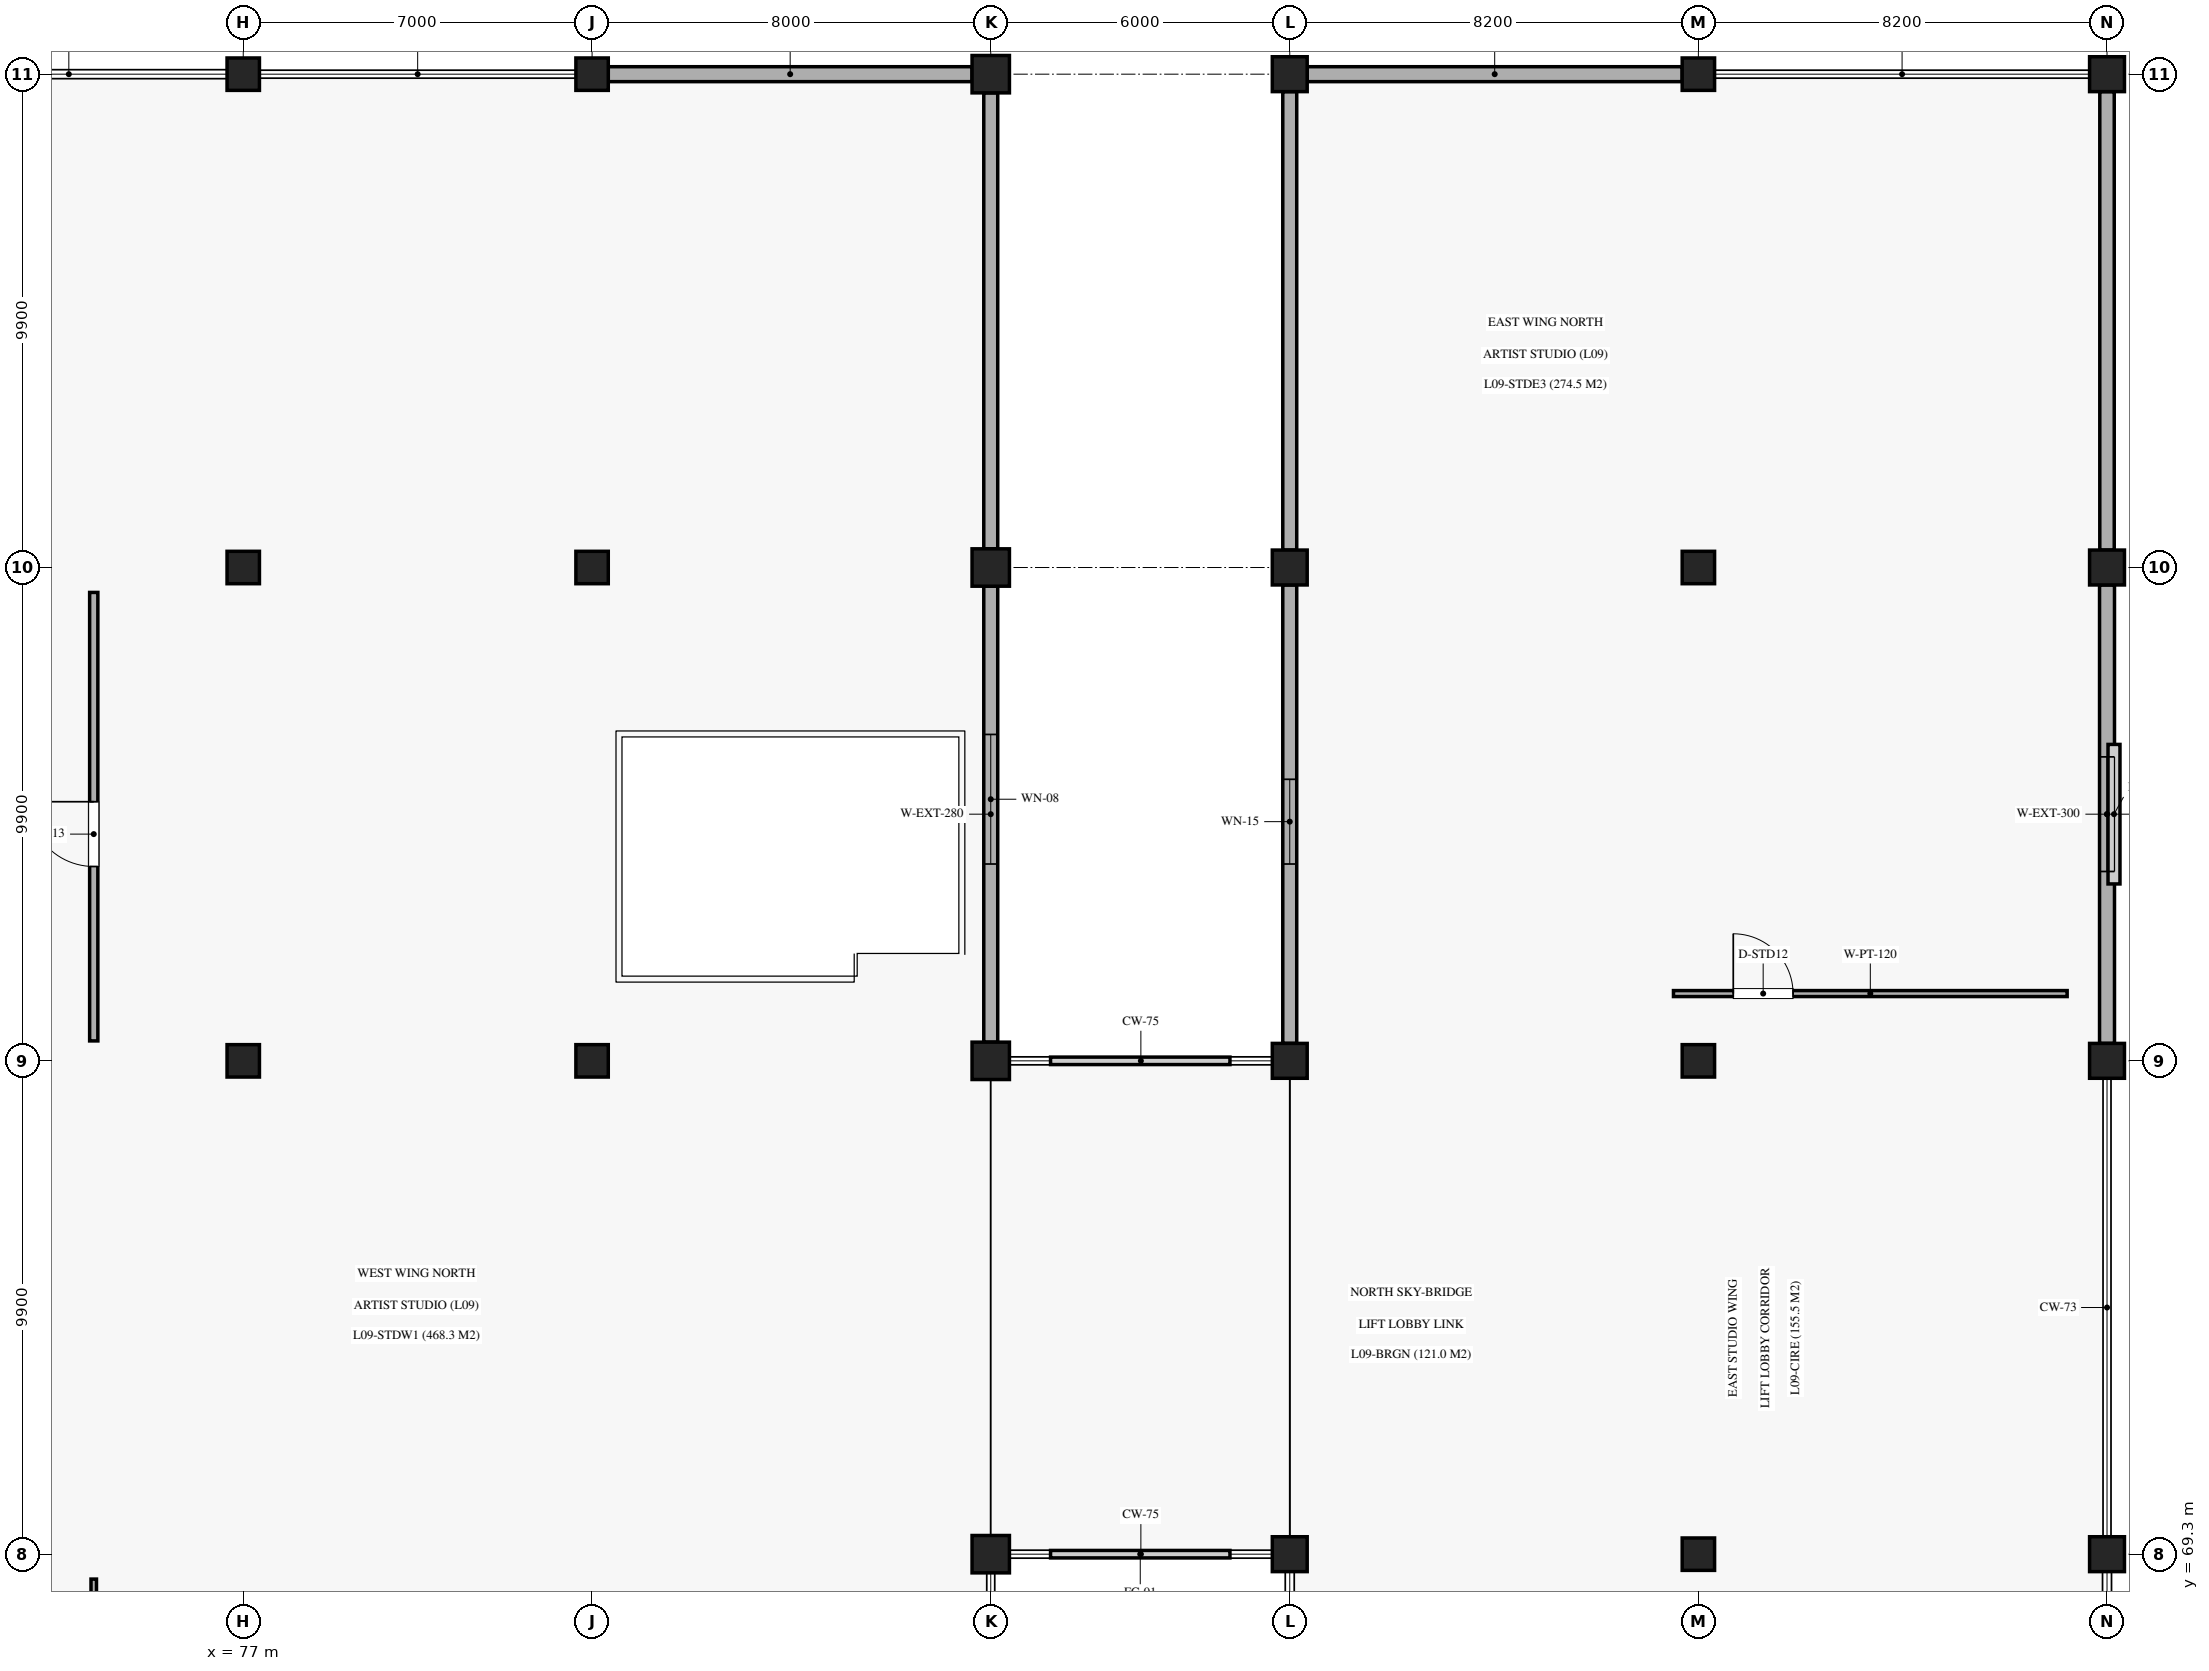
"""IFC4 building model, lengths in metres.
Left out: names, types, materials, properties, quantities, classifications, styles, units other than length and angle.
Written with IfcOpenShell. Run it as: python <this file> out.ifc"""

import sys

from ifc_helpers import new_model, si_unit, direction, frame, frame_2d, origin, origin_2d, place, context, subcontext, project, spatial, rectangle, extrude, element, fill, save


model = new_model("IFC4")
c1 = context("Model", 3, precision=1e-05, world=origin(), true_north=direction((0.0, 1.0)))
c2 = subcontext(c1, "Body", "Model", "MODEL_VIEW")
j1 = project(units=[si_unit("LENGTHUNIT", "METRE"), si_unit("PLANEANGLEUNIT", "RADIAN")], contexts=[c1])
p1 = place(None, origin())
s1 = spatial("IfcSite", under=j1, at=p1, CompositionType="ELEMENT")
p2 = place(p1, origin())
s2 = spatial("IfcBuilding", under=s1, at=p2, CompositionType="ELEMENT")
p3 = place(p2, frame((0.0, 0.0, 46.92)))
s3 = spatial("IfcBuildingStorey", under=s2, at=p3, CompositionType="ELEMENT", Elevation=46.92)
for number, where, z_axis, x_axis in (
    (1, (77.0, 79.2, 0.0), (0.0, 0.0, 1.0), (1.0, 0.0, 0.0)),
    (2, (77.0, 89.1, 0.0), (0.0, 0.0, 1.0), (1.0, 0.0, 0.0)),
    (3, (77.0, 99.0, 0.0), (0.0, 0.0, 1.0), (1.0, 0.0, 0.0)),
    (4, (84.0, 79.2, 0.0), (0.0, 0.0, 1.0), (1.0, 0.0, 0.0)),
    (5, (84.0, 89.1, 0.0), (0.0, 0.0, 1.0), (1.0, 0.0, 0.0)),
    (6, (84.0, 99.0, 0.0), (0.0, 0.0, 1.0), (1.0, 0.0, 0.0)),
):
    element("IfcColumn", number, at=place(p3, frame(where, z_axis=z_axis, x_axis=x_axis)), inside=s3, PredefinedType="COLUMN", context=c2, shape_type="SweptSolid", body=[
        extrude(rectangle(XDim=0.65, YDim=0.65, at=origin_2d()), origin(), (0.0, 0.0, 1.0), 5.1),
    ])
for number, where, z_axis, x_axis in (
    (7, (92.0, 69.3, 0.0), (0.0, 0.0, 1.0), (1.0, 0.0, 0.0)),
    (8, (92.0, 79.2, 0.0), (0.0, 0.0, 1.0), (1.0, 0.0, 0.0)),
    (9, (92.0, 89.1, 0.0), (0.0, 0.0, 1.0), (1.0, 0.0, 0.0)),
    (10, (92.0, 99.0, 0.0), (0.0, 0.0, 1.0), (1.0, 0.0, 0.0)),
):
    element("IfcColumn", number, at=place(p3, frame(where, z_axis=z_axis, x_axis=x_axis)), inside=s3, PredefinedType="COLUMN", context=c2, shape_type="SweptSolid", body=[
        extrude(rectangle(XDim=0.75, YDim=0.75, at=origin_2d()), origin(), (0.0, 0.0, 1.0), 5.1),
    ])
for number, where, z_axis, x_axis in (
    (11, (98.0, 69.3, 0.0), (0.0, 0.0, 1.0), (1.0, 0.0, 0.0)),
    (12, (98.0, 79.2, 0.0), (0.0, 0.0, 1.0), (1.0, 0.0, 0.0)),
    (13, (98.0, 89.1, 0.0), (0.0, 0.0, 1.0), (1.0, 0.0, 0.0)),
    (14, (98.0, 99.0, 0.0), (0.0, 0.0, 1.0), (1.0, 0.0, 0.0)),
):
    element("IfcColumn", number, at=place(p3, frame(where, z_axis=z_axis, x_axis=x_axis)), inside=s3, PredefinedType="COLUMN", context=c2, shape_type="SweptSolid", body=[
        extrude(rectangle(XDim=0.7, YDim=0.7, at=origin_2d()), origin(), (0.0, 0.0, 1.0), 5.1),
    ])
for number, where, z_axis, x_axis in (
    (15, (106.2, 69.3, 0.0), (0.0, 0.0, 1.0), (1.0, 0.0, 0.0)),
    (16, (106.2, 79.2, 0.0), (0.0, 0.0, 1.0), (1.0, 0.0, 0.0)),
    (17, (106.2, 89.1, 0.0), (0.0, 0.0, 1.0), (1.0, 0.0, 0.0)),
    (18, (106.2, 99.0, 0.0), (0.0, 0.0, 1.0), (1.0, 0.0, 0.0)),
):
    element("IfcColumn", number, at=place(p3, frame(where, z_axis=z_axis, x_axis=x_axis)), inside=s3, PredefinedType="COLUMN", context=c2, shape_type="SweptSolid", body=[
        extrude(rectangle(XDim=0.65, YDim=0.65, at=origin_2d()), origin(), (0.0, 0.0, 1.0), 5.1),
    ])
for number, where, z_axis, x_axis in (
    (19, (114.4, 69.3, 0.0), (0.0, 0.0, 1.0), (1.0, 0.0, 0.0)),
    (20, (114.4, 79.2, 0.0), (0.0, 0.0, 1.0), (1.0, 0.0, 0.0)),
    (21, (114.4, 89.1, 0.0), (0.0, 0.0, 1.0), (1.0, 0.0, 0.0)),
    (22, (114.4, 99.0, 0.0), (0.0, 0.0, 1.0), (1.0, 0.0, 0.0)),
):
    element("IfcColumn", number, at=place(p3, frame(where, z_axis=z_axis, x_axis=x_axis)), inside=s3, PredefinedType="COLUMN", context=c2, shape_type="SweptSolid", body=[
        extrude(rectangle(XDim=0.7, YDim=0.7, at=origin_2d()), origin(), (0.0, 0.0, 1.0), 5.1),
    ])
p4 = place(p3, frame((92.0, 79.575, 0.0), z_axis=(0.0, 0.0, 1.0), x_axis=(0.0, 1.0, 0.0)))
e23 = element("IfcWall", 23, at=p4, inside=s3, PredefinedType="SOLIDWALL", context=c2, shape_type="SweptSolid", body=[
    extrude(rectangle(XDim=9.15, YDim=0.28, at=frame_2d((4.575, 0.0))), origin(), (0.0, 0.0, 1.0), 4.1),
])
p5 = place(p4, frame((3.575, 0.0, 1.45)))
e24 = element("IfcOpeningElement", 24, at=p5, cuts=e23, PredefinedType="OPENING", context=c2, shape_type="SweptSolid", body=[
    extrude(rectangle(XDim=2.6, YDim=1.85, at=frame_2d((1.3, 0.925))), frame((0.0, 0.15, 0.0), z_axis=(0.0, -1.0, 0.0), x_axis=(1.0, 0.0, 0.0)), (0.0, 0.0, 1.0), 0.3),
])
p6 = place(p3, frame((92.0, 89.475, 0.0), z_axis=(0.0, 0.0, 1.0), x_axis=(0.0, 1.0, 0.0)))
e25 = element("IfcWall", 25, at=p6, inside=s3, PredefinedType="SOLIDWALL", context=c2, shape_type="SweptSolid", body=[
    extrude(rectangle(XDim=9.15, YDim=0.28, at=frame_2d((4.575, 0.0))), origin(), (0.0, 0.0, 1.0), 4.1),
])
p7 = place(p3, frame((84.325, 99.0, 0.0), z_axis=(0.0, 0.0, 1.0), x_axis=(1.0, 0.0, 0.0)))
e26 = element("IfcWall", 26, at=p7, inside=s3, PredefinedType="SOLIDWALL", context=c2, shape_type="SweptSolid", body=[
    extrude(rectangle(XDim=7.3, YDim=0.3, at=frame_2d((3.65, 0.0))), origin(), (0.0, 0.0, 1.0), 4.1),
])
p8 = place(p3, frame((98.0, 79.55, 0.0), z_axis=(0.0, 0.0, 1.0), x_axis=(0.0, 1.0, 0.0)))
e27 = element("IfcWall", 27, at=p8, inside=s3, PredefinedType="SOLIDWALL", context=c2, shape_type="SweptSolid", body=[
    extrude(rectangle(XDim=9.2, YDim=0.28, at=frame_2d((4.6, 0.0))), origin(), (0.0, 0.0, 1.0), 4.1),
])
p9 = place(p8, frame((3.6, 0.0, 1.45)))
e28 = element("IfcOpeningElement", 28, at=p9, cuts=e27, PredefinedType="OPENING", context=c2, shape_type="SweptSolid", body=[
    extrude(rectangle(XDim=1.7, YDim=1.4, at=frame_2d((0.85, 0.7))), frame((0.0, 0.15, 0.0), z_axis=(0.0, -1.0, 0.0), x_axis=(1.0, 0.0, 0.0)), (0.0, 0.0, 1.0), 0.3),
])
p10 = place(p3, frame((114.4, 79.55, 0.0), z_axis=(0.0, 0.0, 1.0), x_axis=(0.0, 1.0, 0.0)))
e29 = element("IfcWall", 29, at=p10, inside=s3, PredefinedType="SOLIDWALL", context=c2, shape_type="SweptSolid", body=[
    extrude(rectangle(XDim=9.2, YDim=0.3, at=frame_2d((4.6, 0.0))), origin(), (0.0, 0.0, 1.0), 4.1),
])
p11 = place(p10, frame((3.45, 0.0, 1.65)))
e30 = element("IfcOpeningElement", 30, at=p11, cuts=e29, PredefinedType="OPENING", context=c2, shape_type="SweptSolid", body=[
    extrude(rectangle(XDim=2.3, YDim=1.55, at=frame_2d((1.15, 0.775))), frame((0.0, 0.16, 0.0), z_axis=(0.0, -1.0, 0.0), x_axis=(1.0, 0.0, 0.0)), (0.0, 0.0, 1.0), 0.32),
])
p12 = place(p3, frame((98.0, 89.45, 0.0), z_axis=(0.0, 0.0, 1.0), x_axis=(0.0, 1.0, 0.0)))
e31 = element("IfcWall", 31, at=p12, inside=s3, PredefinedType="SOLIDWALL", context=c2, shape_type="SweptSolid", body=[
    extrude(rectangle(XDim=9.2, YDim=0.28, at=frame_2d((4.6, 0.0))), origin(), (0.0, 0.0, 1.0), 4.1),
])
p13 = place(p3, frame((114.4, 89.45, 0.0), z_axis=(0.0, 0.0, 1.0), x_axis=(0.0, 1.0, 0.0)))
e32 = element("IfcWall", 32, at=p13, inside=s3, PredefinedType="SOLIDWALL", context=c2, shape_type="SweptSolid", body=[
    extrude(rectangle(XDim=9.2, YDim=0.29, at=frame_2d((4.6, 0.0))), origin(), (0.0, 0.0, 1.0), 4.1),
])
p14 = place(p3, frame((98.35, 99.0, 0.0), z_axis=(0.0, 0.0, 1.0), x_axis=(1.0, 0.0, 0.0)))
e33 = element("IfcWall", 33, at=p14, inside=s3, PredefinedType="SOLIDWALL", context=c2, shape_type="SweptSolid", body=[
    extrude(rectangle(XDim=7.525, YDim=0.3, at=frame_2d((3.762, 0.0))), origin(), (0.0, 0.0, 1.0), 4.1),
])
p15 = place(p3, frame((74.0, 56.5, 0.0), z_axis=(0.0, 0.0, 1.0), x_axis=(0.0, 1.0, 0.0)))
e34 = element("IfcWall", 34, at=p15, inside=s3, PredefinedType="PARTITIONING", context=c2, shape_type="SweptSolid", body=[
    extrude(rectangle(XDim=12.3, YDim=0.11, at=frame_2d((6.15, 0.0))), origin(), (0.0, 0.0, 1.0), 3.97),
])
p16 = place(p15, frame((2.5, 0.0, 0.0)))
e35 = element("IfcOpeningElement", 35, at=p16, cuts=e34, PredefinedType="OPENING", context=c2, shape_type="SweptSolid", body=[
    extrude(rectangle(XDim=1.8, YDim=2.45, at=frame_2d((0.9, 1.225))), frame((0.0, 0.065, 0.0), z_axis=(0.0, -1.0, 0.0), x_axis=(1.0, 0.0, 0.0)), (0.0, 0.0, 1.0), 0.13),
])
p17 = place(p3, frame((74.0, 79.6, 0.0), z_axis=(0.0, 0.0, 1.0), x_axis=(0.0, 1.0, 0.0)))
e36 = element("IfcWall", 36, at=p17, inside=s3, PredefinedType="PARTITIONING", context=c2, shape_type="SweptSolid", body=[
    extrude(rectangle(XDim=9.0, YDim=0.165, at=frame_2d((4.5, 0.0))), origin(), (0.0, 0.0, 1.0), 3.97),
])
p18 = place(p17, frame((3.5, 0.0, 0.0)))
e37 = element("IfcOpeningElement", 37, at=p18, cuts=e36, PredefinedType="OPENING", context=c2, shape_type="SweptSolid", body=[
    extrude(rectangle(XDim=1.3, YDim=2.25, at=frame_2d((0.65, 1.125))), frame((0.0, 0.093, 0.0), z_axis=(0.0, -1.0, 0.0), x_axis=(1.0, 0.0, 0.0)), (0.0, 0.0, 1.0), 0.185),
])
p19 = place(p3, frame((105.7, 80.55, 0.0), z_axis=(0.0, 0.0, 1.0), x_axis=(1.0, 0.0, 0.0)))
e38 = element("IfcWall", 38, at=p19, inside=s3, PredefinedType="PARTITIONING", context=c2, shape_type="SweptSolid", body=[
    extrude(rectangle(XDim=7.9, YDim=0.12, at=frame_2d((3.95, 0.0))), origin(), (0.0, 0.0, 1.0), 3.97),
])
p20 = place(p19, frame((1.2, 0.0, 0.0)))
e39 = element("IfcOpeningElement", 39, at=p20, cuts=e38, PredefinedType="OPENING", context=c2, shape_type="SweptSolid", body=[
    extrude(rectangle(XDim=1.2, YDim=2.25, at=frame_2d((0.6, 1.125))), frame((0.0, 0.07, 0.0), z_axis=(0.0, -1.0, 0.0), x_axis=(1.0, 0.0, 0.0)), (0.0, 0.0, 1.0), 0.14),
])
p21 = place(p5, origin())
e40 = element("IfcWindow", 40, at=p21, inside=s3, PartitioningType="SINGLE_PANEL", PredefinedType="WINDOW", context=c2, shape_type="SweptSolid", body=[
    extrude(rectangle(XDim=2.6, YDim=1.85, at=frame_2d((1.3, 0.925))), frame((0.0, 0.03, 0.0), z_axis=(0.0, -1.0, 0.0), x_axis=(1.0, 0.0, 0.0)), (0.0, 0.0, 1.0), 0.06),
])
fill(e24, e40)
p22 = place(p9, origin())
e41 = element("IfcWindow", 41, at=p22, inside=s3, PartitioningType="SINGLE_PANEL", PredefinedType="WINDOW", context=c2, shape_type="SweptSolid", body=[
    extrude(rectangle(XDim=1.7, YDim=1.4, at=frame_2d((0.85, 0.7))), frame((0.0, 0.03, 0.0), z_axis=(0.0, -1.0, 0.0), x_axis=(1.0, 0.0, 0.0)), (0.0, 0.0, 1.0), 0.06),
])
fill(e28, e41)
p23 = place(p11, origin())
e42 = element("IfcWindow", 42, at=p23, inside=s3, PartitioningType="SINGLE_PANEL", PredefinedType="WINDOW", context=c2, shape_type="SweptSolid", body=[
    extrude(rectangle(XDim=2.3, YDim=1.55, at=frame_2d((1.15, 0.775))), frame((0.0, 0.03, 0.0), z_axis=(0.0, -1.0, 0.0), x_axis=(1.0, 0.0, 0.0)), (0.0, 0.0, 1.0), 0.06),
])
fill(e30, e42)
p24 = place(p18, origin())
e43 = element("IfcDoor", 43, at=p24, inside=s3, OperationType="SINGLE_SWING_RIGHT", PredefinedType="DOOR", context=c2, shape_type="SweptSolid", body=[
    extrude(rectangle(XDim=1.3, YDim=2.25, at=frame_2d((0.65, 1.125))), frame((0.0, 0.025, 0.0), z_axis=(0.0, -1.0, 0.0), x_axis=(1.0, 0.0, 0.0)), (0.0, 0.0, 1.0), 0.05),
])
fill(e37, e43)
p25 = place(p20, origin())
e44 = element("IfcDoor", 44, at=p25, inside=s3, OperationType="SINGLE_SWING_LEFT", PredefinedType="DOOR", context=c2, shape_type="SweptSolid", body=[
    extrude(rectangle(XDim=1.2, YDim=2.25, at=frame_2d((0.6, 1.125))), frame((0.0, 0.025, 0.0), z_axis=(0.0, -1.0, 0.0), x_axis=(1.0, 0.0, 0.0)), (0.0, 0.0, 1.0), 0.05),
])
fill(e39, e44)
save(model, sys.argv[1])
